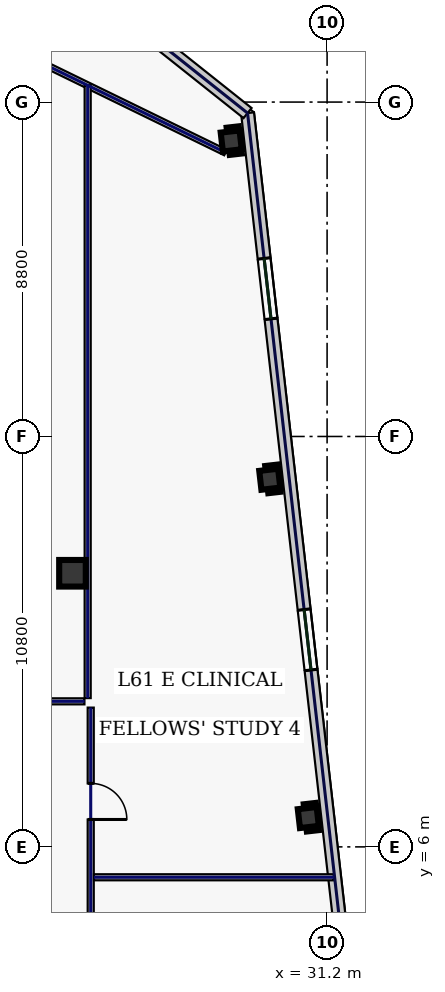
"""IFC4 building model, lengths in metres.
Left out: names, types, materials, properties, quantities, classifications, styles, units other than length and angle.
Written with IfcOpenShell. Run it as: python <this file> out.ifc"""

import sys

from ifc_helpers import new_model, si_unit, direction, frame, frame_2d, origin, origin_2d, place, context, subcontext, project, spatial, rectangle, hollow_rectangle, extrude, element, fill, save


model = new_model("IFC4")
c1 = context("Model", 3, precision=1e-05, world=origin(), true_north=direction((0.0, 1.0)))
c2 = subcontext(c1, "Body", "Model", "MODEL_VIEW")
j1 = project(units=[si_unit("LENGTHUNIT", "METRE"), si_unit("PLANEANGLEUNIT", "RADIAN")], contexts=[c1])
p1 = place(None, origin())
s1 = spatial("IfcSite", under=j1, at=p1, CompositionType="ELEMENT")
p2 = place(p1, origin())
s2 = spatial("IfcBuilding", under=s1, at=p2, CompositionType="ELEMENT")
p3 = place(p2, frame((0.0, 0.0, 263.0)))
s3 = spatial("IfcBuildingStorey", under=s2, at=p3, CompositionType="ELEMENT", Elevation=263.0)
p4 = place(p3, frame((24.5, 13.2, 0.0), z_axis=(0.0, 0.0, 1.0), x_axis=(1.0, 0.0, 0.0)))
e1 = element("IfcColumn", 1, at=p4, inside=s3, PredefinedType="COLUMN", context=c2, shape_type="SweptSolid", body=[
    extrude(hollow_rectangle(XDim=0.7, YDim=0.7, WallThickness=0.032, at=origin_2d()), origin(), (0.0, 0.0, 1.0), 3.74),
])
for number, where, z_axis, x_axis in (
    (2, (30.706, 6.772, 0.0), (0.0, 0.0, 1.0), (0.994, 0.113, 0.0)),
    (3, (29.691, 15.674, 0.0), (0.0, 0.0, 1.0), (0.994, 0.113, 0.0)),
    (4, (28.677, 24.577, 0.0), (0.0, 0.0, 1.0), (0.994, 0.113, 0.0)),
):
    element("IfcColumn", number, at=place(p3, frame(where, z_axis=z_axis, x_axis=x_axis)), inside=s3, PredefinedType="COLUMN", context=c2, shape_type="SweptSolid", body=[
        extrude(hollow_rectangle(XDim=0.5, YDim=0.5, WallThickness=0.025, at=origin_2d()), origin(), (0.0, 0.0, 1.0), 3.74),
    ])
p5 = place(p3, frame((33.318, -11.651, 0.0), z_axis=(0.0, 0.0, 1.0), x_axis=(-0.11320360501, 0.9935718111, 0.0)))
e5 = element("IfcWall", 5, at=p5, inside=s3, PredefinedType="STANDARD", context=c2, shape_type="SweptSolid", body=[
    extrude(rectangle(XDim=37.2, YDim=0.34, at=frame_2d((18.6, 0.0))), origin(), (0.0, 0.0, 1.0), 3.74),
])
p6 = place(p5, frame((3.85, 0.0, 0.58)))
e6 = element("IfcOpeningElement", 6, at=p6, cuts=e5, PredefinedType="OPENING", context=c2, shape_type="SweptSolid", body=[
    extrude(rectangle(XDim=1.6, YDim=2.3, at=frame_2d((0.8, 1.15))), frame((0.0, 0.18, 0.0), z_axis=(0.0, -1.0, 0.0), x_axis=(1.0, 0.0, 0.0)), (0.0, 0.0, 1.0), 0.36),
])
p7 = place(p5, frame((14.25, 0.0, 0.75)))
e7 = element("IfcOpeningElement", 7, at=p7, cuts=e5, PredefinedType="OPENING", context=c2, shape_type="SweptSolid", body=[
    extrude(rectangle(XDim=0.85, YDim=1.85, at=frame_2d((0.425, 0.925))), frame((0.0, 0.18, 0.0), z_axis=(0.0, -1.0, 0.0), x_axis=(1.0, 0.0, 0.0)), (0.0, 0.0, 1.0), 0.36),
])
p8 = place(p5, frame((22.45, 0.0, 0.58)))
e8 = element("IfcOpeningElement", 8, at=p8, cuts=e5, PredefinedType="OPENING", context=c2, shape_type="SweptSolid", body=[
    extrude(rectangle(XDim=1.6, YDim=2.3, at=frame_2d((0.8, 1.15))), frame((0.0, 0.18, 0.0), z_axis=(0.0, -1.0, 0.0), x_axis=(1.0, 0.0, 0.0)), (0.0, 0.0, 1.0), 0.36),
])
p9 = place(p5, frame((31.75, 0.0, 0.58)))
e9 = element("IfcOpeningElement", 9, at=p9, cuts=e5, PredefinedType="OPENING", context=c2, shape_type="SweptSolid", body=[
    extrude(rectangle(XDim=1.6, YDim=2.3, at=frame_2d((0.8, 1.15))), frame((0.0, 0.18, 0.0), z_axis=(0.0, -1.0, 0.0), x_axis=(1.0, 0.0, 0.0)), (0.0, 0.0, 1.0), 0.36),
])
p10 = place(p3, frame((29.107, 25.31, 0.0), z_axis=(0.0, 0.0, 1.0), x_axis=(-0.78259733853, 0.62252823689, 0.0)))
e10 = element("IfcWall", 10, at=p10, inside=s3, PredefinedType="STANDARD", context=c2, shape_type="SweptSolid", body=[
    extrude(rectangle(XDim=6.548, YDim=0.34, at=frame_2d((3.274, 0.0))), origin(), (0.0, 0.0, 1.0), 3.74),
])
p11 = place(p3, frame((28.528, 24.271, 0.0), z_axis=(0.0, 0.0, 1.0), x_axis=(-0.898820692789, 0.438316509173, 0.0)))
e11 = element("IfcWall", 11, at=p11, inside=s3, PredefinedType="PARTITIONING", context=c2, shape_type="SweptSolid", body=[
    extrude(rectangle(XDim=6.107, YDim=0.16, at=frame_2d((3.053, 0.0))), origin(), (0.0, 0.0, 1.0), 3.74),
])
p12 = place(p3, frame((-24.815, 9.83, 0.0), z_axis=(0.0, 0.0, 1.0), x_axis=(1.0, 0.0, 0.0)))
e12 = element("IfcWall", 12, at=p12, inside=s3, PredefinedType="PARTITIONING", context=c2, shape_type="SweptSolid", body=[
    extrude(rectangle(XDim=49.63, YDim=0.16, at=frame_2d((24.815, 0.0))), origin(), (0.0, 0.0, 1.0), 3.74),
])
p13 = place(p12, frame((1.869, 0.0, 0.0)))
e13 = element("IfcOpeningElement", 13, at=p13, cuts=e12, PredefinedType="OPENING", context=c2, shape_type="SweptSolid", body=[
    extrude(rectangle(XDim=1.3, YDim=2.2, at=frame_2d((0.65, 1.1))), frame((0.0, 0.09, 0.0), z_axis=(0.0, -1.0, 0.0), x_axis=(1.0, 0.0, 0.0)), (0.0, 0.0, 1.0), 0.18),
])
p14 = place(p12, frame((7.613, 0.0, 0.0)))
e14 = element("IfcOpeningElement", 14, at=p14, cuts=e12, PredefinedType="OPENING", context=c2, shape_type="SweptSolid", body=[
    extrude(rectangle(XDim=0.95, YDim=2.2, at=frame_2d((0.475, 1.1))), frame((0.0, 0.09, 0.0), z_axis=(0.0, -1.0, 0.0), x_axis=(1.0, 0.0, 0.0)), (0.0, 0.0, 1.0), 0.18),
])
p15 = place(p12, frame((14.038, 0.0, 0.0)))
e15 = element("IfcOpeningElement", 15, at=p15, cuts=e12, PredefinedType="OPENING", context=c2, shape_type="SweptSolid", body=[
    extrude(rectangle(XDim=0.95, YDim=2.2, at=frame_2d((0.475, 1.1))), frame((0.0, 0.09, 0.0), z_axis=(0.0, -1.0, 0.0), x_axis=(1.0, 0.0, 0.0)), (0.0, 0.0, 1.0), 0.18),
])
p16 = place(p12, frame((21.125, 0.0, 0.0)))
e16 = element("IfcOpeningElement", 16, at=p16, cuts=e12, PredefinedType="OPENING", context=c2, shape_type="SweptSolid", body=[
    extrude(rectangle(XDim=1.3, YDim=2.2, at=frame_2d((0.65, 1.1))), frame((0.0, 0.09, 0.0), z_axis=(0.0, -1.0, 0.0), x_axis=(1.0, 0.0, 0.0)), (0.0, 0.0, 1.0), 0.18),
])
p17 = place(p12, frame((29.225, 0.0, 0.0)))
e17 = element("IfcOpeningElement", 17, at=p17, cuts=e12, PredefinedType="OPENING", context=c2, shape_type="SweptSolid", body=[
    extrude(rectangle(XDim=1.3, YDim=2.2, at=frame_2d((0.65, 1.1))), frame((0.0, 0.09, 0.0), z_axis=(0.0, -1.0, 0.0), x_axis=(1.0, 0.0, 0.0)), (0.0, 0.0, 1.0), 0.18),
])
p18 = place(p12, frame((36.312, 0.0, 0.0)))
e18 = element("IfcOpeningElement", 18, at=p18, cuts=e12, PredefinedType="OPENING", context=c2, shape_type="SweptSolid", body=[
    extrude(rectangle(XDim=0.95, YDim=2.2, at=frame_2d((0.475, 1.1))), frame((0.0, 0.09, 0.0), z_axis=(0.0, -1.0, 0.0), x_axis=(1.0, 0.0, 0.0)), (0.0, 0.0, 1.0), 0.18),
])
p19 = place(p12, frame((41.863, 0.0, 0.0)))
e19 = element("IfcOpeningElement", 19, at=p19, cuts=e12, PredefinedType="OPENING", context=c2, shape_type="SweptSolid", body=[
    extrude(rectangle(XDim=1.3, YDim=2.2, at=frame_2d((0.65, 1.1))), frame((0.0, 0.09, 0.0), z_axis=(0.0, -1.0, 0.0), x_axis=(1.0, 0.0, 0.0)), (0.0, 0.0, 1.0), 0.18),
])
p20 = place(p12, frame((46.806, 0.0, 0.0)))
e20 = element("IfcOpeningElement", 20, at=p20, cuts=e12, PredefinedType="OPENING", context=c2, shape_type="SweptSolid", body=[
    extrude(rectangle(XDim=0.95, YDim=2.2, at=frame_2d((0.475, 1.1))), frame((0.0, 0.09, 0.0), z_axis=(0.0, -1.0, 0.0), x_axis=(1.0, 0.0, 0.0)), (0.0, 0.0, 1.0), 0.18),
])
p21 = place(p3, frame((24.98, 9.665, 0.0), z_axis=(0.0, 0.0, 1.0), x_axis=(0.0, -1.0, 0.0)))
e21 = element("IfcWall", 21, at=p21, inside=s3, PredefinedType="PARTITIONING", context=c2, shape_type="SweptSolid", body=[
    extrude(rectangle(XDim=19.28, YDim=0.16, at=frame_2d((9.64, 0.0))), origin(), (0.0, 0.0, 1.0), 3.74),
])
p22 = place(p21, frame((16.531, 0.0, 0.0)))
e22 = element("IfcOpeningElement", 22, at=p22, cuts=e21, PredefinedType="OPENING", context=c2, shape_type="SweptSolid", body=[
    extrude(rectangle(XDim=0.95, YDim=2.2, at=frame_2d((0.475, 1.1))), frame((0.0, 0.09, 0.0), z_axis=(0.0, -1.0, 0.0), x_axis=(1.0, 0.0, 0.0)), (0.0, 0.0, 1.0), 0.18),
])
p23 = place(p21, frame((11.25, 0.0, 0.0)))
e23 = element("IfcOpeningElement", 23, at=p23, cuts=e21, PredefinedType="OPENING", context=c2, shape_type="SweptSolid", body=[
    extrude(rectangle(XDim=0.95, YDim=2.2, at=frame_2d((0.475, 1.1))), frame((0.0, 0.09, 0.0), z_axis=(0.0, -1.0, 0.0), x_axis=(1.0, 0.0, 0.0)), (0.0, 0.0, 1.0), 0.18),
])
p24 = place(p21, frame((6.05, 0.0, 0.0)))
e24 = element("IfcOpeningElement", 24, at=p24, cuts=e21, PredefinedType="OPENING", context=c2, shape_type="SweptSolid", body=[
    extrude(rectangle(XDim=0.95, YDim=2.2, at=frame_2d((0.475, 1.1))), frame((0.0, 0.09, 0.0), z_axis=(0.0, -1.0, 0.0), x_axis=(1.0, 0.0, 0.0)), (0.0, 0.0, 1.0), 0.18),
])
p25 = place(p21, frame((1.994, 0.0, 0.0)))
e25 = element("IfcOpeningElement", 25, at=p25, cuts=e21, PredefinedType="OPENING", context=c2, shape_type="SweptSolid", body=[
    extrude(rectangle(XDim=0.95, YDim=2.2, at=frame_2d((0.475, 1.1))), frame((0.0, 0.09, 0.0), z_axis=(0.0, -1.0, 0.0), x_axis=(1.0, 0.0, 0.0)), (0.0, 0.0, 1.0), 0.18),
])
p26 = place(p3, frame((24.9, 9.915, 0.0), z_axis=(0.0, 0.0, 1.0), x_axis=(0.0, 1.0, 0.0)))
e26 = element("IfcWall", 26, at=p26, inside=s3, PredefinedType="PARTITIONING", context=c2, shape_type="SweptSolid", body=[
    extrude(rectangle(XDim=16.129, YDim=0.16, at=frame_2d((8.065, 0.0))), origin(), (0.0, 0.0, 1.0), 3.74),
])
p27 = place(p3, frame((25.065, 5.2, 0.0), z_axis=(0.0, 0.0, 1.0), x_axis=(1.0, 0.0, 0.0)))
e27 = element("IfcWall", 27, at=p27, inside=s3, PredefinedType="PARTITIONING", context=c2, shape_type="SweptSolid", body=[
    extrude(rectangle(XDim=6.313, YDim=0.16, at=frame_2d((3.157, 0.0))), origin(), (0.0, 0.0, 1.0), 3.74),
])
p28 = place(p8, origin())
e28 = element("IfcWindow", 28, at=p28, inside=s3, PartitioningType="SINGLE_PANEL", PredefinedType="WINDOW", context=c2, shape_type="SweptSolid", body=[
    extrude(rectangle(XDim=1.6, YDim=2.3, at=frame_2d((0.8, 1.15))), frame((0.0, 0.03, 0.0), z_axis=(0.0, -1.0, 0.0), x_axis=(1.0, 0.0, 0.0)), (0.0, 0.0, 1.0), 0.06),
])
fill(e8, e28)
p29 = place(p9, origin())
e29 = element("IfcWindow", 29, at=p29, inside=s3, PartitioningType="SINGLE_PANEL", PredefinedType="WINDOW", context=c2, shape_type="SweptSolid", body=[
    extrude(rectangle(XDim=1.6, YDim=2.3, at=frame_2d((0.8, 1.15))), frame((0.0, 0.03, 0.0), z_axis=(0.0, -1.0, 0.0), x_axis=(1.0, 0.0, 0.0)), (0.0, 0.0, 1.0), 0.06),
])
fill(e9, e29)
p30 = place(p25, origin())
e30 = element("IfcDoor", 30, at=p30, inside=s3, OperationType="SINGLE_SWING_RIGHT", PredefinedType="DOOR", context=c2, shape_type="SweptSolid", body=[
    extrude(rectangle(XDim=0.95, YDim=2.2, at=frame_2d((0.475, 1.1))), frame((0.0, 0.025, 0.0), z_axis=(0.0, -1.0, 0.0), x_axis=(1.0, 0.0, 0.0)), (0.0, 0.0, 1.0), 0.05),
])
fill(e25, e30)
save(model, sys.argv[1])
